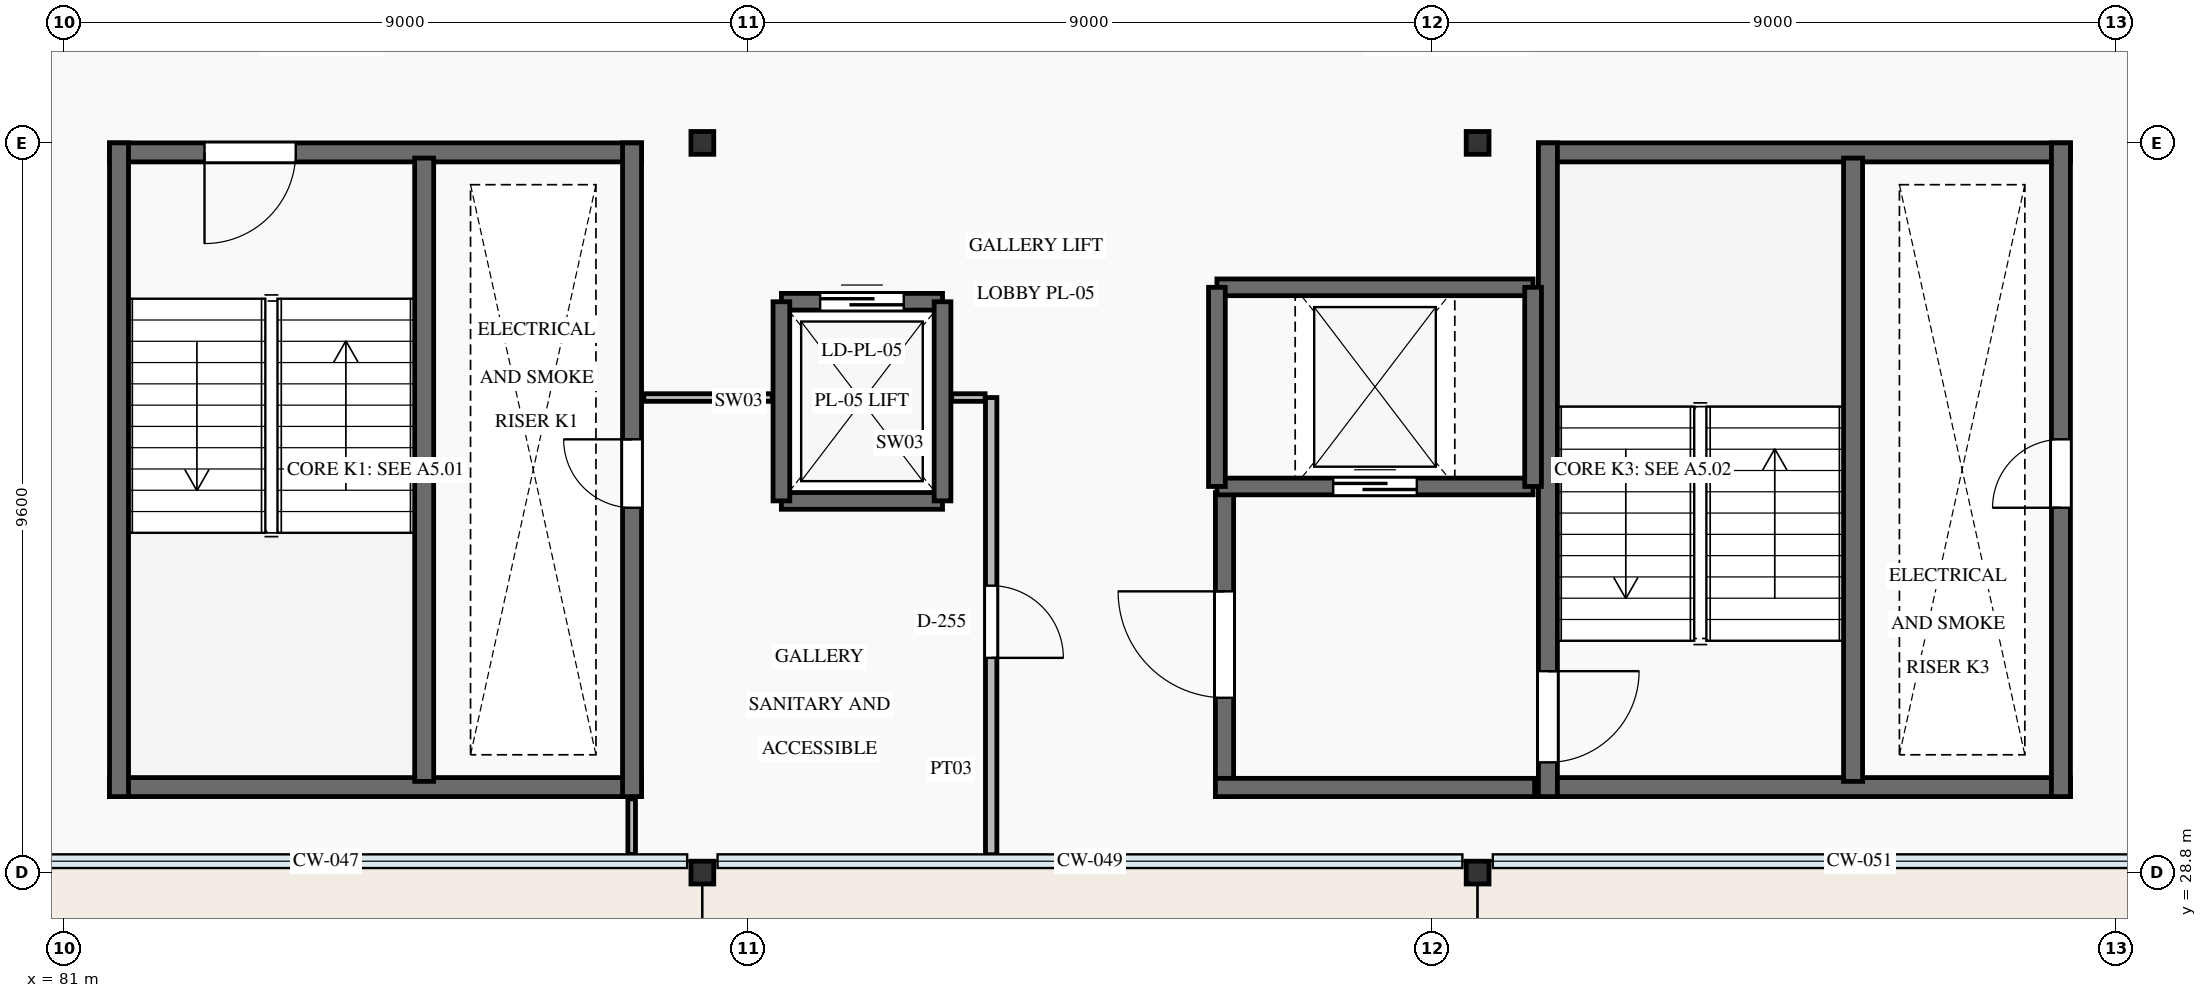
"""IFC4 building model, lengths in metres.
Left out: names, types, materials, properties, quantities, classifications, styles, units other than length and angle.
Written with IfcOpenShell. Run it as: python <this file> out.ifc"""

import sys

from ifc_helpers import new_model, si_unit, direction, frame, frame_2d, origin, origin_2d, place, context, subcontext, project, spatial, rectangle, i_section, extrude, element, fill, save


model = new_model("IFC4")
c1 = context("Model", 3, precision=1e-05, world=origin(), true_north=direction((0.0, 1.0)))
c2 = subcontext(c1, "Body", "Model", "MODEL_VIEW")
j1 = project(units=[si_unit("LENGTHUNIT", "METRE"), si_unit("PLANEANGLEUNIT", "RADIAN")], contexts=[c1])
p1 = place(None, origin())
s1 = spatial("IfcSite", under=j1, at=p1, CompositionType="ELEMENT")
p2 = place(p1, origin())
s2 = spatial("IfcBuilding", under=s1, at=p2, CompositionType="ELEMENT")
p3 = place(p2, frame((0.0, 0.0, 10.8)))
s3 = spatial("IfcBuildingStorey", under=s2, at=p3, CompositionType="ELEMENT", Elevation=10.8)
for number, where, z_axis, x_axis in (
    (1, (89.4, 28.8, 0.0), (0.0, 0.0, 1.0), (1.0, 0.0, 0.0)),
    (2, (89.4, 38.4, 0.0), (0.0, 0.0, 1.0), (1.0, 0.0, 0.0)),
    (3, (99.6, 28.8, 0.0), (0.0, 0.0, 1.0), (1.0, 0.0, 0.0)),
    (4, (99.6, 38.4, 0.0), (0.0, 0.0, 1.0), (1.0, 0.0, 0.0)),
):
    element("IfcColumn", number, at=place(p3, frame(where, z_axis=z_axis, x_axis=x_axis)), inside=s3, PredefinedType="COLUMN", context=c2, shape_type="SweptSolid", body=[
        extrude(i_section(OverallWidth=0.3, OverallDepth=0.3, WebThickness=0.011, FlangeThickness=0.019, FilletRadius=0.027, at=origin_2d()), origin(), (0.0, 0.0, 1.0), 4.2),
    ])
p4 = place(p3, frame((81.6, 29.925, 0.0), z_axis=(0.0, 0.0, 1.0), x_axis=(1.0, 0.0, 0.0)))
e5 = element("IfcWall", 5, at=p4, inside=s3, PredefinedType="SHEAR", context=c2, shape_type="SweptSolid", body=[
    extrude(rectangle(XDim=7.0, YDim=0.25, at=frame_2d((3.5, 0.0))), origin(), (0.0, 0.0, 1.0), 4.2),
])
p5 = place(p3, frame((81.6, 38.275, 0.0), z_axis=(0.0, 0.0, 1.0), x_axis=(1.0, 0.0, 0.0)))
e6 = element("IfcWall", 6, at=p5, inside=s3, PredefinedType="SHEAR", context=c2, shape_type="SweptSolid", body=[
    extrude(rectangle(XDim=7.0, YDim=0.25, at=frame_2d((3.5, 0.0))), origin(), (0.0, 0.0, 1.0), 4.2),
])
p6 = place(p5, frame((1.25, 0.0, 0.0)))
e7 = element("IfcOpeningElement", 7, at=p6, cuts=e6, PredefinedType="OPENING", context=c2, shape_type="SweptSolid", body=[
    extrude(rectangle(XDim=1.2, YDim=2.15, at=frame_2d((0.6, 1.075))), frame((0.0, 0.14, 0.0), z_axis=(0.0, -1.0, 0.0), x_axis=(1.0, 0.0, 0.0)), (0.0, 0.0, 1.0), 0.28),
])
p7 = place(p3, frame((81.725, 29.8, 0.0), z_axis=(0.0, 0.0, 1.0), x_axis=(0.0, 1.0, 0.0)))
e8 = element("IfcWall", 8, at=p7, inside=s3, PredefinedType="SHEAR", context=c2, shape_type="SweptSolid", body=[
    extrude(rectangle(XDim=8.6, YDim=0.25, at=frame_2d((4.3, 0.0))), origin(), (0.0, 0.0, 1.0), 4.2),
])
p8 = place(p3, frame((88.475, 29.8, 0.0), z_axis=(0.0, 0.0, 1.0), x_axis=(0.0, 1.0, 0.0)))
e9 = element("IfcWall", 9, at=p8, inside=s3, PredefinedType="SHEAR", context=c2, shape_type="SweptSolid", body=[
    extrude(rectangle(XDim=8.6, YDim=0.25, at=frame_2d((4.3, 0.0))), origin(), (0.0, 0.0, 1.0), 4.2),
])
p9 = place(p8, frame((3.8, 0.0, 0.0)))
e10 = element("IfcOpeningElement", 10, at=p9, cuts=e9, PredefinedType="OPENING", context=c2, shape_type="SweptSolid", body=[
    extrude(rectangle(XDim=0.9, YDim=2.05, at=frame_2d((0.45, 1.025))), frame((0.0, 0.14, 0.0), z_axis=(0.0, -1.0, 0.0), x_axis=(1.0, 0.0, 0.0)), (0.0, 0.0, 1.0), 0.28),
])
p10 = place(p3, frame((85.74, 30.0, 0.0), z_axis=(0.0, 0.0, 1.0), x_axis=(0.0, 1.0, 0.0)))
e11 = element("IfcWall", 11, at=p10, inside=s3, PredefinedType="SHEAR", context=c2, shape_type="SweptSolid", body=[
    extrude(rectangle(XDim=8.2, YDim=0.25, at=frame_2d((4.1, 0.0))), origin(), (0.0, 0.0, 1.0), 4.2),
])
for number, where, z_axis, x_axis in (
    (12, (100.4, 29.925, 0.0), (0.0, 0.0, 1.0), (1.0, 0.0, 0.0)),
    (13, (100.4, 38.275, 0.0), (0.0, 0.0, 1.0), (1.0, 0.0, 0.0)),
):
    element("IfcWall", number, at=place(p3, frame(where, z_axis=z_axis, x_axis=x_axis)), inside=s3, PredefinedType="SHEAR", context=c2, shape_type="SweptSolid", body=[
        extrude(rectangle(XDim=7.0, YDim=0.25, at=frame_2d((3.5, 0.0))), origin(), (0.0, 0.0, 1.0), 4.2),
    ])
p11 = place(p3, frame((100.525, 29.8, 0.0), z_axis=(0.0, 0.0, 1.0), x_axis=(0.0, 1.0, 0.0)))
e14 = element("IfcWall", 14, at=p11, inside=s3, PredefinedType="SHEAR", context=c2, shape_type="SweptSolid", body=[
    extrude(rectangle(XDim=8.6, YDim=0.25, at=frame_2d((4.3, 0.0))), origin(), (0.0, 0.0, 1.0), 4.2),
])
p12 = place(p11, frame((0.45, 0.0, 0.0)))
e15 = element("IfcOpeningElement", 15, at=p12, cuts=e14, PredefinedType="OPENING", context=c2, shape_type="SweptSolid", body=[
    extrude(rectangle(XDim=1.2, YDim=2.15, at=frame_2d((0.6, 1.075))), frame((0.0, 0.14, 0.0), z_axis=(0.0, -1.0, 0.0), x_axis=(1.0, 0.0, 0.0)), (0.0, 0.0, 1.0), 0.28),
])
p13 = place(p3, frame((107.275, 29.8, 0.0), z_axis=(0.0, 0.0, 1.0), x_axis=(0.0, 1.0, 0.0)))
e16 = element("IfcWall", 16, at=p13, inside=s3, PredefinedType="SHEAR", context=c2, shape_type="SweptSolid", body=[
    extrude(rectangle(XDim=8.6, YDim=0.25, at=frame_2d((4.3, 0.0))), origin(), (0.0, 0.0, 1.0), 4.2),
])
p14 = place(p13, frame((3.8, 0.0, 0.0)))
e17 = element("IfcOpeningElement", 17, at=p14, cuts=e16, PredefinedType="OPENING", context=c2, shape_type="SweptSolid", body=[
    extrude(rectangle(XDim=0.9, YDim=2.05, at=frame_2d((0.45, 1.025))), frame((0.0, 0.14, 0.0), z_axis=(0.0, -1.0, 0.0), x_axis=(1.0, 0.0, 0.0)), (0.0, 0.0, 1.0), 0.28),
])
p15 = place(p3, frame((104.54, 30.0, 0.0), z_axis=(0.0, 0.0, 1.0), x_axis=(0.0, 1.0, 0.0)))
e18 = element("IfcWall", 18, at=p15, inside=s3, PredefinedType="SHEAR", context=c2, shape_type="SweptSolid", body=[
    extrude(rectangle(XDim=8.2, YDim=0.25, at=frame_2d((4.1, 0.0))), origin(), (0.0, 0.0, 1.0), 4.2),
])
p16 = place(p3, frame((96.27, 29.8, 0.0), z_axis=(0.0, 0.0, 1.0), x_axis=(0.0, 1.0, 0.0)))
e19 = element("IfcWall", 19, at=p16, inside=s3, PredefinedType="SHEAR", context=c2, shape_type="SweptSolid", body=[
    extrude(rectangle(XDim=4.0, YDim=0.24, at=frame_2d((2.0, 0.0))), origin(), (0.0, 0.0, 1.0), 4.2),
])
p17 = place(p16, frame((1.3, 0.0, 0.0)))
e20 = element("IfcOpeningElement", 20, at=p17, cuts=e19, PredefinedType="OPENING", context=c2, shape_type="SweptSolid", body=[
    extrude(rectangle(XDim=1.4, YDim=2.2, at=frame_2d((0.7, 1.1))), frame((0.0, 0.135, 0.0), z_axis=(0.0, -1.0, 0.0), x_axis=(1.0, 0.0, 0.0)), (0.0, 0.0, 1.0), 0.27),
])
p18 = place(p3, frame((96.15, 29.92, 0.0), z_axis=(0.0, 0.0, 1.0), x_axis=(1.0, 0.0, 0.0)))
e21 = element("IfcWall", 21, at=p18, inside=s3, PredefinedType="SHEAR", context=c2, shape_type="SweptSolid", body=[
    extrude(rectangle(XDim=4.2, YDim=0.24, at=frame_2d((2.1, 0.0))), origin(), (0.0, 0.0, 1.0), 4.2),
])
p19 = place(p3, frame((90.44, 33.69, 0.0), z_axis=(0.0, 0.0, 1.0), x_axis=(1.0, 0.0, 0.0)))
e22 = element("IfcWall", 22, at=p19, inside=s3, PredefinedType="SHEAR", context=c2, shape_type="SweptSolid", body=[
    extrude(rectangle(XDim=2.12, YDim=0.22, at=frame_2d((1.06, 0.0))), origin(), (0.0, 0.0, 1.0), 4.2),
])
p20 = place(p3, frame((90.44, 36.31, 0.0), z_axis=(0.0, 0.0, 1.0), x_axis=(1.0, 0.0, 0.0)))
e23 = element("IfcWall", 23, at=p20, inside=s3, PredefinedType="SHEAR", context=c2, shape_type="SweptSolid", body=[
    extrude(rectangle(XDim=2.12, YDim=0.22, at=frame_2d((1.06, 0.0))), origin(), (0.0, 0.0, 1.0), 4.2),
])
p21 = place(p20, frame((0.51, 0.0, 0.0)))
e24 = element("IfcOpeningElement", 24, at=p21, cuts=e23, PredefinedType="OPENING", context=c2, shape_type="SweptSolid", body=[
    extrude(rectangle(XDim=1.1, YDim=2.15, at=frame_2d((0.55, 1.075))), frame((0.0, 0.125, 0.0), z_axis=(0.0, -1.0, 0.0), x_axis=(1.0, 0.0, 0.0)), (0.0, 0.0, 1.0), 0.25),
])
for number, where, z_axis, x_axis in (
    (25, (90.44, 33.69, 0.0), (0.0, 0.0, 1.0), (0.0, 1.0, 0.0)),
    (26, (92.56, 33.69, 0.0), (0.0, 0.0, 1.0), (0.0, 1.0, 0.0)),
):
    element("IfcWall", number, at=place(p3, frame(where, z_axis=z_axis, x_axis=x_axis)), inside=s3, PredefinedType="SHEAR", context=c2, shape_type="SweptSolid", body=[
        extrude(rectangle(XDim=2.62, YDim=0.22, at=frame_2d((1.31, 0.0))), origin(), (0.0, 0.0, 1.0), 4.2),
    ])
p22 = place(p3, frame((96.17, 33.88, 0.0), z_axis=(0.0, 0.0, 1.0), x_axis=(1.0, 0.0, 0.0)))
e27 = element("IfcWall", 27, at=p22, inside=s3, PredefinedType="SHEAR", context=c2, shape_type="SweptSolid", body=[
    extrude(rectangle(XDim=4.16, YDim=0.22, at=frame_2d((2.08, 0.0))), origin(), (0.0, 0.0, 1.0), 4.2),
])
p23 = place(p22, frame((1.53, 0.0, 0.0)))
e28 = element("IfcOpeningElement", 28, at=p23, cuts=e27, PredefinedType="OPENING", context=c2, shape_type="SweptSolid", body=[
    extrude(rectangle(XDim=1.1, YDim=2.15, at=frame_2d((0.55, 1.075))), frame((0.0, 0.125, 0.0), z_axis=(0.0, -1.0, 0.0), x_axis=(1.0, 0.0, 0.0)), (0.0, 0.0, 1.0), 0.25),
])
p24 = place(p3, frame((96.17, 36.5, 0.0), z_axis=(0.0, 0.0, 1.0), x_axis=(1.0, 0.0, 0.0)))
e29 = element("IfcWall", 29, at=p24, inside=s3, PredefinedType="SHEAR", context=c2, shape_type="SweptSolid", body=[
    extrude(rectangle(XDim=4.16, YDim=0.22, at=frame_2d((2.08, 0.0))), origin(), (0.0, 0.0, 1.0), 4.2),
])
for number, where, z_axis, x_axis in (
    (30, (96.17, 33.88, 0.0), (0.0, 0.0, 1.0), (0.0, 1.0, 0.0)),
    (31, (100.33, 33.88, 0.0), (0.0, 0.0, 1.0), (0.0, 1.0, 0.0)),
):
    element("IfcWall", number, at=place(p3, frame(where, z_axis=z_axis, x_axis=x_axis)), inside=s3, PredefinedType="SHEAR", context=c2, shape_type="SweptSolid", body=[
        extrude(rectangle(XDim=2.62, YDim=0.22, at=frame_2d((1.31, 0.0))), origin(), (0.0, 0.0, 1.0), 4.2),
    ])
p25 = place(p3, frame((93.2, 29.035, 0.0), z_axis=(0.0, 0.0, 1.0), x_axis=(0.0, 1.0, 0.0)))
e32 = element("IfcWall", 32, at=p25, inside=s3, PredefinedType="PARTITIONING", context=c2, shape_type="SweptSolid", body=[
    extrude(rectangle(XDim=6.015, YDim=0.15, at=frame_2d((3.008, 0.0))), origin(), (0.0, 0.0, 1.0), 3.94),
])
p26 = place(p25, frame((2.59, 0.0, 0.0)))
e33 = element("IfcOpeningElement", 33, at=p26, cuts=e32, PredefinedType="OPENING", context=c2, shape_type="SweptSolid", body=[
    extrude(rectangle(XDim=0.95, YDim=2.1, at=frame_2d((0.475, 1.05))), frame((0.0, 0.09, 0.0), z_axis=(0.0, -1.0, 0.0), x_axis=(1.0, 0.0, 0.0)), (0.0, 0.0, 1.0), 0.18),
])
p27 = place(p3, frame((88.63, 35.05, 0.0), z_axis=(0.0, 0.0, 1.0), x_axis=(1.0, 0.0, 0.0)))
e34 = element("IfcWall", 34, at=p27, inside=s3, PredefinedType="PARTITIONING", context=c2, shape_type="SweptSolid", body=[
    extrude(rectangle(XDim=1.69, YDim=0.1, at=frame_2d((0.845, 0.0))), origin(), (0.0, 0.0, 1.0), 3.94),
])
p28 = place(p3, frame((92.68, 35.05, 0.0), z_axis=(0.0, 0.0, 1.0), x_axis=(1.0, 0.0, 0.0)))
e35 = element("IfcWall", 35, at=p28, inside=s3, PredefinedType="PARTITIONING", context=c2, shape_type="SweptSolid", body=[
    extrude(rectangle(XDim=0.44, YDim=0.1, at=frame_2d((0.22, 0.0))), origin(), (0.0, 0.0, 1.0), 3.94),
])
p29 = place(p3, frame((88.47, 29.04, 0.0), z_axis=(0.0, 0.0, 1.0), x_axis=(0.0, 1.0, 0.0)))
e36 = element("IfcWall", 36, at=p29, inside=s3, PredefinedType="PARTITIONING", context=c2, shape_type="SweptSolid", body=[
    extrude(rectangle(XDim=0.73, YDim=0.1, at=frame_2d((0.365, 0.0))), origin(), (0.0, 0.0, 1.0), 3.94),
])
p30 = place(p6, frame((1.2, 0.0, 0.0), z_axis=(0.0, 0.0, 1.0), x_axis=(-1.0, 0.0, 0.0)))
e37 = element("IfcDoor", 37, at=p30, inside=s3, OperationType="SINGLE_SWING_LEFT", PredefinedType="DOOR", context=c2, shape_type="SweptSolid", body=[
    extrude(rectangle(XDim=1.2, YDim=2.15, at=frame_2d((0.6, 1.075))), frame((0.0, 0.025, 0.0), z_axis=(0.0, -1.0, 0.0), x_axis=(1.0, 0.0, 0.0)), (0.0, 0.0, 1.0), 0.05),
])
fill(e7, e37)
p31 = place(p9, origin())
e38 = element("IfcDoor", 38, at=p31, inside=s3, OperationType="SINGLE_SWING_RIGHT", PredefinedType="DOOR", context=c2, shape_type="SweptSolid", body=[
    extrude(rectangle(XDim=0.9, YDim=2.05, at=frame_2d((0.45, 1.025))), frame((0.0, 0.025, 0.0), z_axis=(0.0, -1.0, 0.0), x_axis=(1.0, 0.0, 0.0)), (0.0, 0.0, 1.0), 0.05),
])
fill(e10, e38)
p32 = place(p12, frame((1.2, 0.0, 0.0), z_axis=(0.0, 0.0, 1.0), x_axis=(-1.0, 0.0, 0.0)))
e39 = element("IfcDoor", 39, at=p32, inside=s3, OperationType="SINGLE_SWING_RIGHT", PredefinedType="DOOR", context=c2, shape_type="SweptSolid", body=[
    extrude(rectangle(XDim=1.2, YDim=2.15, at=frame_2d((0.6, 1.075))), frame((0.0, 0.025, 0.0), z_axis=(0.0, -1.0, 0.0), x_axis=(1.0, 0.0, 0.0)), (0.0, 0.0, 1.0), 0.05),
])
fill(e15, e39)
p33 = place(p14, origin())
e40 = element("IfcDoor", 40, at=p33, inside=s3, OperationType="SINGLE_SWING_LEFT", PredefinedType="DOOR", context=c2, shape_type="SweptSolid", body=[
    extrude(rectangle(XDim=0.9, YDim=2.05, at=frame_2d((0.45, 1.025))), frame((0.0, 0.025, 0.0), z_axis=(0.0, -1.0, 0.0), x_axis=(1.0, 0.0, 0.0)), (0.0, 0.0, 1.0), 0.05),
])
fill(e17, e40)
p34 = place(p17, origin())
e41 = element("IfcDoor", 41, at=p34, inside=s3, OperationType="SINGLE_SWING_RIGHT", PredefinedType="DOOR", context=c2, shape_type="SweptSolid", body=[
    extrude(rectangle(XDim=1.4, YDim=2.2, at=frame_2d((0.7, 1.1))), frame((0.0, 0.025, 0.0), z_axis=(0.0, -1.0, 0.0), x_axis=(1.0, 0.0, 0.0)), (0.0, 0.0, 1.0), 0.05),
])
fill(e20, e41)
p35 = place(p21, origin())
e42 = element("IfcDoor", 42, at=p35, inside=s3, OperationType="SLIDING_TO_RIGHT", PredefinedType="DOOR", context=c2, shape_type="SweptSolid", body=[
    extrude(rectangle(XDim=1.1, YDim=2.15, at=frame_2d((0.55, 1.075))), frame((0.0, 0.025, 0.0), z_axis=(0.0, -1.0, 0.0), x_axis=(1.0, 0.0, 0.0)), (0.0, 0.0, 1.0), 0.05),
])
fill(e24, e42)
p36 = place(p23, origin())
e43 = element("IfcDoor", 43, at=p36, inside=s3, OperationType="SLIDING_TO_LEFT", PredefinedType="DOOR", context=c2, shape_type="SweptSolid", body=[
    extrude(rectangle(XDim=1.1, YDim=2.15, at=frame_2d((0.55, 1.075))), frame((0.0, 0.025, 0.0), z_axis=(0.0, -1.0, 0.0), x_axis=(1.0, 0.0, 0.0)), (0.0, 0.0, 1.0), 0.05),
])
fill(e28, e43)
p37 = place(p26, frame((0.95, 0.0, 0.0), z_axis=(0.0, 0.0, 1.0), x_axis=(-1.0, 0.0, 0.0)))
e44 = element("IfcDoor", 44, at=p37, inside=s3, OperationType="SINGLE_SWING_LEFT", PredefinedType="DOOR", context=c2, shape_type="SweptSolid", body=[
    extrude(rectangle(XDim=0.95, YDim=2.1, at=frame_2d((0.475, 1.05))), frame((0.0, 0.025, 0.0), z_axis=(0.0, -1.0, 0.0), x_axis=(1.0, 0.0, 0.0)), (0.0, 0.0, 1.0), 0.05),
])
fill(e33, e44)
save(model, sys.argv[1])
